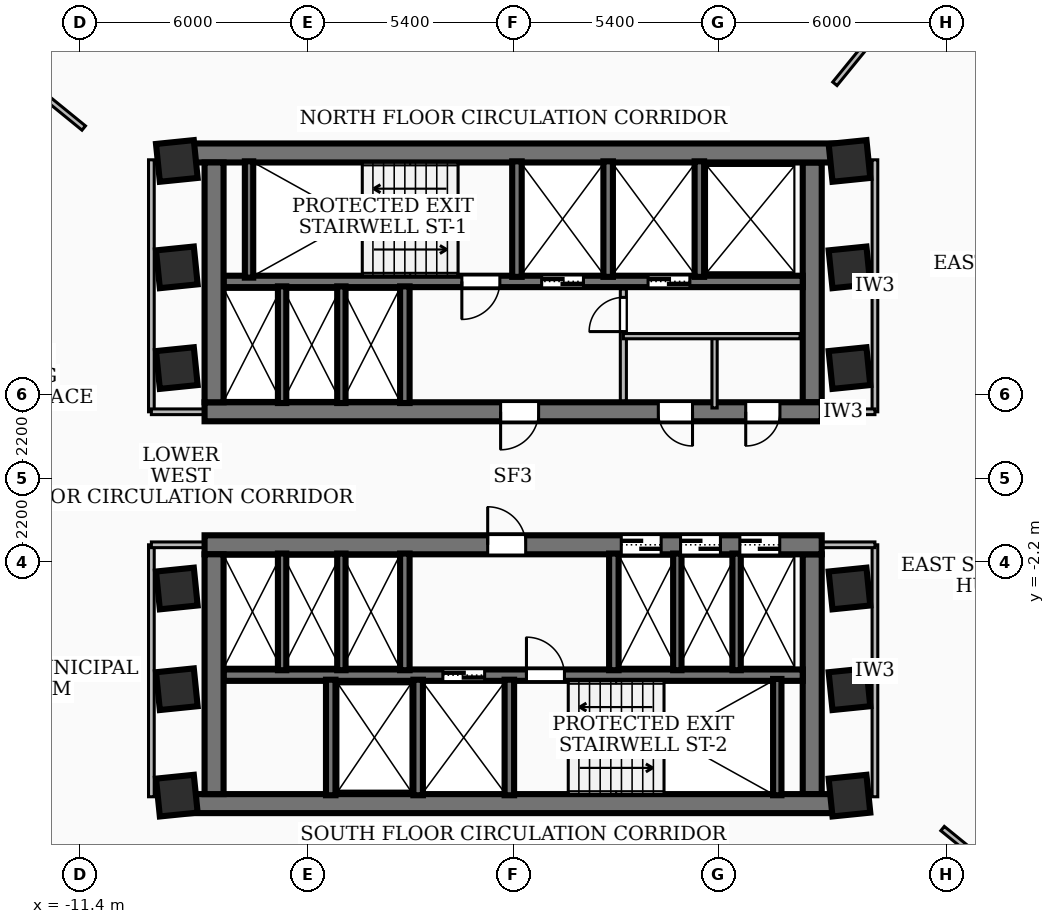
"""IFC4 building model, lengths in metres.
Left out: names, types, materials, properties, quantities, classifications, styles, units other than length and angle.
Written with IfcOpenShell. Run it as: python <this file> out.ifc"""

import sys

from ifc_helpers import new_model, si_unit, direction, frame, frame_2d, origin, origin_2d, place, context, subcontext, project, spatial, rectangle, extrude, element, fill, save


model = new_model("IFC4")
c1 = context("Model", 3, precision=1e-05, world=origin(), true_north=direction((0.0, 1.0)))
c2 = subcontext(c1, "Body", "Model", "MODEL_VIEW")
j1 = project(units=[si_unit("LENGTHUNIT", "METRE"), si_unit("PLANEANGLEUNIT", "RADIAN")], contexts=[c1])
p1 = place(None, origin())
s1 = spatial("IfcSite", under=j1, at=p1, CompositionType="ELEMENT")
p2 = place(p1, origin())
s2 = spatial("IfcBuilding", under=s1, at=p2, CompositionType="ELEMENT")
p3 = place(p2, frame((0.0, 0.0, 67.68)))
s3 = spatial("IfcBuildingStorey", under=s2, at=p3, CompositionType="ELEMENT", Elevation=67.68)
p4 = place(p3, frame((-8.78, 8.56, 0.0), z_axis=(0.0, 0.0, 1.0), x_axis=(1.0, 0.0, 0.0)))
e1 = element("IfcWall", 1, at=p4, inside=s3, PredefinedType="SHEAR", context=c2, shape_type="SweptSolid", body=[
    extrude(rectangle(XDim=17.56, YDim=0.5, at=frame_2d((8.78, 0.0))), origin(), (0.0, 0.0, 1.0), 3.34),
])
p5 = place(p3, frame((8.12, 1.75, 0.0), z_axis=(0.0, 0.0, 1.0), x_axis=(-1.0, 0.0, 0.0)))
e2 = element("IfcWall", 2, at=p5, inside=s3, PredefinedType="SHEAR", context=c2, shape_type="SweptSolid", body=[
    extrude(rectangle(XDim=16.24, YDim=0.5, at=frame_2d((8.12, 0.0))), origin(), (0.0, 0.0, 1.0), 3.34),
])
p6 = place(p5, frame((7.45, 0.0, 0.0)))
e3 = element("IfcOpeningElement", 3, at=p6, cuts=e2, PredefinedType="OPENING", context=c2, shape_type="SweptSolid", body=[
    extrude(rectangle(XDim=1.0, YDim=2.1, at=frame_2d((0.5, 1.05))), frame((0.0, 0.26, 0.0), z_axis=(0.0, -1.0, 0.0), x_axis=(1.0, 0.0, 0.0)), (0.0, 0.0, 1.0), 0.52),
])
p7 = place(p5, frame((3.4, 0.0, 0.0)))
e4 = element("IfcOpeningElement", 4, at=p7, cuts=e2, PredefinedType="OPENING", context=c2, shape_type="SweptSolid", body=[
    extrude(rectangle(XDim=0.9, YDim=2.06, at=frame_2d((0.45, 1.03))), frame((0.0, 0.26, 0.0), z_axis=(0.0, -1.0, 0.0), x_axis=(1.0, 0.0, 0.0)), (0.0, 0.0, 1.0), 0.52),
])
p8 = place(p5, frame((1.1, 0.0, 0.0)))
e5 = element("IfcOpeningElement", 5, at=p8, cuts=e2, PredefinedType="OPENING", context=c2, shape_type="SweptSolid", body=[
    extrude(rectangle(XDim=0.9, YDim=2.06, at=frame_2d((0.45, 1.03))), frame((0.0, 0.26, 0.0), z_axis=(0.0, -1.0, 0.0), x_axis=(1.0, 0.0, 0.0)), (0.0, 0.0, 1.0), 0.52),
])
for number, where, z_axis, x_axis in (
    (6, (-7.87, 2.0, 0.0), (0.0, 0.0, 1.0), (0.0, 1.0, 0.0)),
    (7, (7.87, 8.31, 0.0), (0.0, 0.0, 1.0), (0.0, -1.0, 0.0)),
):
    element("IfcWall", number, at=place(p3, frame(where, z_axis=z_axis, x_axis=x_axis)), inside=s3, PredefinedType="SHEAR", context=c2, shape_type="SweptSolid", body=[
        extrude(rectangle(XDim=6.31, YDim=0.5, at=frame_2d((3.155, 0.0))), origin(), (0.0, 0.0, 1.0), 3.34),
    ])
p9 = place(p3, frame((7.62, 5.18, 0.0), z_axis=(0.0, 0.0, 1.0), x_axis=(-1.0, 0.0, 0.0)))
e8 = element("IfcWall", 8, at=p9, inside=s3, PredefinedType="SOLIDWALL", context=c2, shape_type="SweptSolid", body=[
    extrude(rectangle(XDim=15.24, YDim=0.3, at=frame_2d((7.62, 0.0))), origin(), (0.0, 0.0, 1.0), 3.34),
])
p10 = place(p9, frame((5.77, 0.0, 0.0)))
e9 = element("IfcOpeningElement", 9, at=p10, cuts=e8, PredefinedType="OPENING", context=c2, shape_type="SweptSolid", body=[
    extrude(rectangle(XDim=1.1, YDim=2.15, at=frame_2d((0.55, 1.075))), frame((0.0, 0.16, 0.0), z_axis=(0.0, -1.0, 0.0), x_axis=(1.0, 0.0, 0.0)), (0.0, 0.0, 1.0), 0.32),
])
p11 = place(p9, frame((2.97, 0.0, 0.0)))
e10 = element("IfcOpeningElement", 10, at=p11, cuts=e8, PredefinedType="OPENING", context=c2, shape_type="SweptSolid", body=[
    extrude(rectangle(XDim=1.1, YDim=2.15, at=frame_2d((0.55, 1.075))), frame((0.0, 0.16, 0.0), z_axis=(0.0, -1.0, 0.0), x_axis=(1.0, 0.0, 0.0)), (0.0, 0.0, 1.0), 0.32),
])
p12 = place(p9, frame((7.97, 0.0, 0.0)))
e11 = element("IfcOpeningElement", 11, at=p12, cuts=e8, PredefinedType="OPENING", context=c2, shape_type="SweptSolid", body=[
    extrude(rectangle(XDim=1.0, YDim=2.1, at=frame_2d((0.5, 1.05))), frame((0.0, 0.16, 0.0), z_axis=(0.0, -1.0, 0.0), x_axis=(1.0, 0.0, 0.0)), (0.0, 0.0, 1.0), 0.32),
])
p13 = place(p3, frame((8.78, -8.56, 0.0), z_axis=(0.0, 0.0, 1.0), x_axis=(-1.0, 0.0, 0.0)))
e12 = element("IfcWall", 12, at=p13, inside=s3, PredefinedType="SHEAR", context=c2, shape_type="SweptSolid", body=[
    extrude(rectangle(XDim=17.56, YDim=0.5, at=frame_2d((8.78, 0.0))), origin(), (0.0, 0.0, 1.0), 3.34),
])
p14 = place(p3, frame((-8.12, -1.75, 0.0), z_axis=(0.0, 0.0, 1.0), x_axis=(1.0, 0.0, 0.0)))
e13 = element("IfcWall", 13, at=p14, inside=s3, PredefinedType="SHEAR", context=c2, shape_type="SweptSolid", body=[
    extrude(rectangle(XDim=16.24, YDim=0.5, at=frame_2d((8.12, 0.0))), origin(), (0.0, 0.0, 1.0), 3.34),
])
p15 = place(p14, frame((7.45, 0.0, 0.0)))
e14 = element("IfcOpeningElement", 14, at=p15, cuts=e13, PredefinedType="OPENING", context=c2, shape_type="SweptSolid", body=[
    extrude(rectangle(XDim=1.0, YDim=2.1, at=frame_2d((0.5, 1.05))), frame((0.0, 0.26, 0.0), z_axis=(0.0, -1.0, 0.0), x_axis=(1.0, 0.0, 0.0)), (0.0, 0.0, 1.0), 0.52),
])
p16 = place(p14, frame((10.965, 0.0, 0.0)))
e15 = element("IfcOpeningElement", 15, at=p16, cuts=e13, PredefinedType="OPENING", context=c2, shape_type="SweptSolid", body=[
    extrude(rectangle(XDim=1.05, YDim=2.15, at=frame_2d((0.525, 1.075))), frame((0.0, 0.26, 0.0), z_axis=(0.0, -1.0, 0.0), x_axis=(1.0, 0.0, 0.0)), (0.0, 0.0, 1.0), 0.52),
])
p17 = place(p14, frame((12.525, 0.0, 0.0)))
e16 = element("IfcOpeningElement", 16, at=p17, cuts=e13, PredefinedType="OPENING", context=c2, shape_type="SweptSolid", body=[
    extrude(rectangle(XDim=1.05, YDim=2.15, at=frame_2d((0.525, 1.075))), frame((0.0, 0.26, 0.0), z_axis=(0.0, -1.0, 0.0), x_axis=(1.0, 0.0, 0.0)), (0.0, 0.0, 1.0), 0.52),
])
p18 = place(p14, frame((14.085, 0.0, 0.0)))
e17 = element("IfcOpeningElement", 17, at=p18, cuts=e13, PredefinedType="OPENING", context=c2, shape_type="SweptSolid", body=[
    extrude(rectangle(XDim=1.05, YDim=2.15, at=frame_2d((0.525, 1.075))), frame((0.0, 0.26, 0.0), z_axis=(0.0, -1.0, 0.0), x_axis=(1.0, 0.0, 0.0)), (0.0, 0.0, 1.0), 0.52),
])
for number, where, z_axis, x_axis in (
    (18, (-7.87, -8.31, 0.0), (0.0, 0.0, 1.0), (0.0, 1.0, 0.0)),
    (19, (7.87, -2.0, 0.0), (0.0, 0.0, 1.0), (0.0, -1.0, 0.0)),
):
    element("IfcWall", number, at=place(p3, frame(where, z_axis=z_axis, x_axis=x_axis)), inside=s3, PredefinedType="SHEAR", context=c2, shape_type="SweptSolid", body=[
        extrude(rectangle(XDim=6.31, YDim=0.5, at=frame_2d((3.155, 0.0))), origin(), (0.0, 0.0, 1.0), 3.34),
    ])
p19 = place(p3, frame((-7.62, -5.18, 0.0), z_axis=(0.0, 0.0, 1.0), x_axis=(1.0, 0.0, 0.0)))
e20 = element("IfcWall", 20, at=p19, inside=s3, PredefinedType="SOLIDWALL", context=c2, shape_type="SweptSolid", body=[
    extrude(rectangle(XDim=15.24, YDim=0.3, at=frame_2d((7.62, 0.0))), origin(), (0.0, 0.0, 1.0), 3.34),
])
p20 = place(p19, frame((5.77, 0.0, 0.0)))
e21 = element("IfcOpeningElement", 21, at=p20, cuts=e20, PredefinedType="OPENING", context=c2, shape_type="SweptSolid", body=[
    extrude(rectangle(XDim=1.1, YDim=2.15, at=frame_2d((0.55, 1.075))), frame((0.0, 0.16, 0.0), z_axis=(0.0, -1.0, 0.0), x_axis=(1.0, 0.0, 0.0)), (0.0, 0.0, 1.0), 0.32),
])
p21 = place(p19, frame((7.97, 0.0, 0.0)))
e22 = element("IfcOpeningElement", 22, at=p21, cuts=e20, PredefinedType="OPENING", context=c2, shape_type="SweptSolid", body=[
    extrude(rectangle(XDim=1.0, YDim=2.1, at=frame_2d((0.5, 1.05))), frame((0.0, 0.16, 0.0), z_axis=(0.0, -1.0, 0.0), x_axis=(1.0, 0.0, 0.0)), (0.0, 0.0, 1.0), 0.32),
])
for number, where, z_axis, x_axis in (
    (23, (-6.95, 5.28, 0.0), (0.0, 0.0, 1.0), (0.0, 1.0, 0.0)),
    (24, (6.95, -8.34, 0.0), (0.0, 0.0, 1.0), (0.0, 1.0, 0.0)),
):
    element("IfcWall", number, at=place(p3, frame(where, z_axis=z_axis, x_axis=x_axis)), inside=s3, PredefinedType="SOLIDWALL", context=c2, shape_type="SweptSolid", body=[
        extrude(rectangle(XDim=3.06, YDim=0.22, at=frame_2d((1.53, 0.0))), origin(), (0.0, 0.0, 1.0), 3.34),
    ])
for number, where, z_axis, x_axis in (
    (25, (0.1, 5.3, 0.0), (0.0, 0.0, 1.0), (0.0, 1.0, 0.0)),
    (26, (2.5, 5.3, 0.0), (0.0, 0.0, 1.0), (0.0, 1.0, 0.0)),
    (27, (4.9, 5.3, 0.0), (0.0, 0.0, 1.0), (0.0, 1.0, 0.0)),
):
    element("IfcWall", number, at=place(p3, frame(where, z_axis=z_axis, x_axis=x_axis)), inside=s3, PredefinedType="SOLIDWALL", context=c2, shape_type="SweptSolid", body=[
        extrude(rectangle(XDim=3.04, YDim=0.25, at=frame_2d((1.52, 0.0))), origin(), (0.0, 0.0, 1.0), 3.34),
    ])
p22 = place(p3, frame((-2.85, 1.98, 0.0), z_axis=(0.0, 0.0, 1.0), x_axis=(0.0, 1.0, 0.0)))
e28 = element("IfcWall", 28, at=p22, inside=s3, PredefinedType="SOLIDWALL", context=c2, shape_type="SweptSolid", body=[
    extrude(rectangle(XDim=3.07, YDim=0.25, at=frame_2d((1.535, 0.0))), origin(), (0.0, 0.0, 1.0), 3.34),
])
for number, where, z_axis, x_axis in (
    (29, (-0.1, -8.34, 0.0), (0.0, 0.0, 1.0), (0.0, 1.0, 0.0)),
    (30, (-2.5, -8.34, 0.0), (0.0, 0.0, 1.0), (0.0, 1.0, 0.0)),
    (31, (-4.8, -8.34, 0.0), (0.0, 0.0, 1.0), (0.0, 1.0, 0.0)),
):
    element("IfcWall", number, at=place(p3, frame(where, z_axis=z_axis, x_axis=x_axis)), inside=s3, PredefinedType="SOLIDWALL", context=c2, shape_type="SweptSolid", body=[
        extrude(rectangle(XDim=3.04, YDim=0.25, at=frame_2d((1.52, 0.0))), origin(), (0.0, 0.0, 1.0), 3.34),
    ])
for number, where, z_axis, x_axis in (
    (32, (-2.85, -5.05, 0.0), (0.0, 0.0, 1.0), (0.0, 1.0, 0.0)),
    (33, (2.65, -5.05, 0.0), (0.0, 0.0, 1.0), (0.0, 1.0, 0.0)),
):
    element("IfcWall", number, at=place(p3, frame(where, z_axis=z_axis, x_axis=x_axis)), inside=s3, PredefinedType="SOLIDWALL", context=c2, shape_type="SweptSolid", body=[
        extrude(rectangle(XDim=3.07, YDim=0.25, at=frame_2d((1.535, 0.0))), origin(), (0.0, 0.0, 1.0), 3.34),
    ])
for number, where, z_axis, x_axis in (
    (34, (-6.08, 1.98, 0.0), (0.0, 0.0, 1.0), (0.0, 1.0, 0.0)),
    (35, (-4.52, 1.98, 0.0), (0.0, 0.0, 1.0), (0.0, 1.0, 0.0)),
    (36, (4.32, -5.05, 0.0), (0.0, 0.0, 1.0), (0.0, 1.0, 0.0)),
    (37, (5.88, -5.05, 0.0), (0.0, 0.0, 1.0), (0.0, 1.0, 0.0)),
    (38, (-6.08, -5.05, 0.0), (0.0, 0.0, 1.0), (0.0, 1.0, 0.0)),
    (39, (-4.52, -5.05, 0.0), (0.0, 0.0, 1.0), (0.0, 1.0, 0.0)),
):
    element("IfcWall", number, at=place(p3, frame(where, z_axis=z_axis, x_axis=x_axis)), inside=s3, PredefinedType="SOLIDWALL", context=c2, shape_type="SweptSolid", body=[
        extrude(rectangle(XDim=3.07, YDim=0.22, at=frame_2d((1.535, 0.0))), origin(), (0.0, 0.0, 1.0), 3.34),
    ])
for number, where, z_axis, x_axis in (
    (40, (-8.85, -5.55, 0.0), (0.0, 0.0, 1.0), (0.995, 0.101, 0.0)),
    (41, (-8.85, -2.9, 0.0), (0.0, 0.0, 1.0), (0.995, 0.101, 0.0)),
    (42, (-8.85, 2.9, 0.0), (0.0, 0.0, 1.0), (0.995, 0.101, 0.0)),
    (43, (-8.85, 5.55, 0.0), (0.0, 0.0, 1.0), (0.995, 0.101, 0.0)),
    (44, (8.85, -5.55, 0.0), (0.0, 0.0, 1.0), (0.995, 0.101, 0.0)),
    (45, (8.85, -2.9, 0.0), (0.0, 0.0, 1.0), (0.995, 0.101, 0.0)),
    (46, (8.85, 2.9, 0.0), (0.0, 0.0, 1.0), (0.995, 0.101, 0.0)),
    (47, (8.85, 5.55, 0.0), (0.0, 0.0, 1.0), (0.995, 0.101, 0.0)),
    (48, (-8.85, 8.35, 0.0), (0.0, 0.0, 1.0), (0.995, 0.101, 0.0)),
    (49, (8.85, -8.35, 0.0), (0.0, 0.0, 1.0), (0.995, 0.101, 0.0)),
    (50, (8.85, 8.35, 0.0), (0.0, 0.0, 1.0), (0.995, 0.101, 0.0)),
    (51, (-8.85, -8.35, 0.0), (0.0, 0.0, 1.0), (0.995, 0.101, 0.0)),
):
    element("IfcColumn", number, at=place(p3, frame(where, z_axis=z_axis, x_axis=x_axis)), inside=s3, PredefinedType="COLUMN", context=c2, shape_type="SweptSolid", body=[
        extrude(rectangle(XDim=1.0, YDim=1.0, at=origin_2d()), origin(), (0.0, 0.0, 1.0), 3.6),
    ])
p23 = place(p3, frame((2.9, 2.04, 0.0), z_axis=(0.0, 0.0, 1.0), x_axis=(0.0, 1.0, 0.0)))
e52 = element("IfcWall", 52, at=p23, inside=s3, PredefinedType="PARTITIONING", context=c2, shape_type="SweptSolid", body=[
    extrude(rectangle(XDim=2.94, YDim=0.16, at=frame_2d((1.47, 0.0))), origin(), (0.0, 0.0, 1.0), 2.405),
])
p24 = place(p23, frame((1.82, 0.0, 0.0)))
e53 = element("IfcOpeningElement", 53, at=p24, cuts=e52, PredefinedType="OPENING", context=c2, shape_type="SweptSolid", body=[
    extrude(rectangle(XDim=0.9, YDim=2.06, at=frame_2d((0.45, 1.03))), frame((0.0, 0.09, 0.0), z_axis=(0.0, -1.0, 0.0), x_axis=(1.0, 0.0, 0.0)), (0.0, 0.0, 1.0), 0.18),
])
p25 = place(p3, frame((2.9, 3.74, 0.0), z_axis=(0.0, 0.0, 1.0), x_axis=(1.0, 0.0, 0.0)))
e54 = element("IfcWall", 54, at=p25, inside=s3, PredefinedType="PARTITIONING", context=c2, shape_type="SweptSolid", body=[
    extrude(rectangle(XDim=4.65, YDim=0.138, at=frame_2d((2.325, 0.0))), origin(), (0.0, 0.0, 1.0), 3.34),
])
p26 = place(p3, frame((5.3, 1.85, 0.0), z_axis=(0.0, 0.0, 1.0), x_axis=(0.0, 1.0, 0.0)))
e55 = element("IfcWall", 55, at=p26, inside=s3, PredefinedType="PARTITIONING", context=c2, shape_type="SweptSolid", body=[
    extrude(rectangle(XDim=1.89, YDim=0.138, at=frame_2d((0.945, 0.0))), origin(), (0.0, 0.0, 1.0), 2.405),
])
p27 = place(p3, frame((-9.52, 1.75, 0.0), z_axis=(0.0, 0.0, 1.0), x_axis=(0.0, 1.0, 0.0)))
e56 = element("IfcWall", 56, at=p27, inside=s3, PredefinedType="PARTITIONING", context=c2, shape_type="SweptSolid", body=[
    extrude(rectangle(XDim=6.63, YDim=0.15, at=frame_2d((3.315, 0.0))), origin(), (0.0, 0.0, 1.0), 2.486),
])
p28 = place(p3, frame((-7.85, 1.75, 0.0), z_axis=(0.0, 0.0, 1.0), x_axis=(-1.0, 0.0, 0.0)))
e57 = element("IfcWall", 57, at=p28, inside=s3, PredefinedType="PARTITIONING", context=c2, shape_type="SweptSolid", body=[
    extrude(rectangle(XDim=1.67, YDim=0.15, at=frame_2d((0.835, 0.0))), origin(), (0.0, 0.0, 1.0), 2.405),
])
p29 = place(p3, frame((-9.52, -8.38, 0.0), z_axis=(0.0, 0.0, 1.0), x_axis=(0.0, 1.0, 0.0)))
e58 = element("IfcWall", 58, at=p29, inside=s3, PredefinedType="PARTITIONING", context=c2, shape_type="SweptSolid", body=[
    extrude(rectangle(XDim=6.63, YDim=0.15, at=frame_2d((3.315, 0.0))), origin(), (0.0, 0.0, 1.0), 2.486),
])
p30 = place(p3, frame((-7.85, -1.75, 0.0), z_axis=(0.0, 0.0, 1.0), x_axis=(-1.0, 0.0, 0.0)))
e59 = element("IfcWall", 59, at=p30, inside=s3, PredefinedType="PARTITIONING", context=c2, shape_type="SweptSolid", body=[
    extrude(rectangle(XDim=1.67, YDim=0.15, at=frame_2d((0.835, 0.0))), origin(), (0.0, 0.0, 1.0), 2.405),
])
p31 = place(p3, frame((9.52, 1.75, 0.0), z_axis=(0.0, 0.0, 1.0), x_axis=(0.0, 1.0, 0.0)))
e60 = element("IfcWall", 60, at=p31, inside=s3, PredefinedType="PARTITIONING", context=c2, shape_type="SweptSolid", body=[
    extrude(rectangle(XDim=6.63, YDim=0.15, at=frame_2d((3.315, 0.0))), origin(), (0.0, 0.0, 1.0), 2.486),
])
p32 = place(p3, frame((7.85, 1.75, 0.0), z_axis=(0.0, 0.0, 1.0), x_axis=(1.0, 0.0, 0.0)))
e61 = element("IfcWall", 61, at=p32, inside=s3, PredefinedType="PARTITIONING", context=c2, shape_type="SweptSolid", body=[
    extrude(rectangle(XDim=1.67, YDim=0.15, at=frame_2d((0.835, 0.0))), origin(), (0.0, 0.0, 1.0), 2.405),
])
p33 = place(p3, frame((9.52, -8.38, 0.0), z_axis=(0.0, 0.0, 1.0), x_axis=(0.0, 1.0, 0.0)))
e62 = element("IfcWall", 62, at=p33, inside=s3, PredefinedType="PARTITIONING", context=c2, shape_type="SweptSolid", body=[
    extrude(rectangle(XDim=6.63, YDim=0.15, at=frame_2d((3.315, 0.0))), origin(), (0.0, 0.0, 1.0), 2.486),
])
p34 = place(p3, frame((7.85, -1.75, 0.0), z_axis=(0.0, 0.0, 1.0), x_axis=(1.0, 0.0, 0.0)))
e63 = element("IfcWall", 63, at=p34, inside=s3, PredefinedType="PARTITIONING", context=c2, shape_type="SweptSolid", body=[
    extrude(rectangle(XDim=1.67, YDim=0.15, at=frame_2d((0.835, 0.0))), origin(), (0.0, 0.0, 1.0), 2.405),
])
p35 = place(p3, frame((8.466, 10.38, 0.0), z_axis=(0.0, 0.0, 1.0), x_axis=(0.631992375104, 0.774974604623, 0.0)))
e64 = element("IfcWall", 64, at=p35, inside=s3, PredefinedType="PARTITIONING", context=c2, shape_type="SweptSolid", body=[
    extrude(rectangle(XDim=6.26, YDim=0.145, at=frame_2d((3.13, 0.0))), origin(), (0.0, 0.0, 1.0), 3.34),
])
for number, where, z_axis, x_axis in (
    (65, (-11.3, 9.216, 0.0), (0.0, 0.0, 1.0), (-0.775, 0.632, 0.0)),
    (66, (11.3, -9.216, 0.0), (0.0, 0.0, 1.0), (0.775, -0.632, 0.0)),
):
    element("IfcWall", number, at=place(p3, frame(where, z_axis=z_axis, x_axis=x_axis)), inside=s3, PredefinedType="PARTITIONING", context=c2, shape_type="SweptSolid", body=[
        extrude(rectangle(XDim=5.073, YDim=0.145, at=frame_2d((2.536, 0.0))), origin(), (0.0, 0.0, 1.0), 3.34),
    ])
p36 = place(p6, origin())
e67 = element("IfcDoor", 67, at=p36, inside=s3, OperationType="SINGLE_SWING_RIGHT", PredefinedType="DOOR", context=c2, shape_type="SweptSolid", body=[
    extrude(rectangle(XDim=1.0, YDim=2.1, at=frame_2d((0.5, 1.05))), frame((0.0, 0.025, 0.0), z_axis=(0.0, -1.0, 0.0), x_axis=(1.0, 0.0, 0.0)), (0.0, 0.0, 1.0), 0.05),
])
fill(e3, e67)
p37 = place(p15, origin())
e68 = element("IfcDoor", 68, at=p37, inside=s3, OperationType="SINGLE_SWING_LEFT", PredefinedType="DOOR", context=c2, shape_type="SweptSolid", body=[
    extrude(rectangle(XDim=1.0, YDim=2.1, at=frame_2d((0.5, 1.05))), frame((0.0, 0.025, 0.0), z_axis=(0.0, -1.0, 0.0), x_axis=(1.0, 0.0, 0.0)), (0.0, 0.0, 1.0), 0.05),
])
fill(e14, e68)
p38 = place(p10, origin())
e69 = element("IfcDoor", 69, at=p38, inside=s3, OperationType="DOUBLE_DOOR_SLIDING", PredefinedType="DOOR", context=c2, shape_type="SweptSolid", body=[
    extrude(rectangle(XDim=1.1, YDim=2.15, at=frame_2d((0.55, 1.075))), frame((0.0, 0.025, 0.0), z_axis=(0.0, -1.0, 0.0), x_axis=(1.0, 0.0, 0.0)), (0.0, 0.0, 1.0), 0.05),
])
fill(e9, e69)
p39 = place(p11, origin())
e70 = element("IfcDoor", 70, at=p39, inside=s3, OperationType="DOUBLE_DOOR_SLIDING", PredefinedType="DOOR", context=c2, shape_type="SweptSolid", body=[
    extrude(rectangle(XDim=1.1, YDim=2.15, at=frame_2d((0.55, 1.075))), frame((0.0, 0.025, 0.0), z_axis=(0.0, -1.0, 0.0), x_axis=(1.0, 0.0, 0.0)), (0.0, 0.0, 1.0), 0.05),
])
fill(e10, e70)
p40 = place(p12, origin())
e71 = element("IfcDoor", 71, at=p40, inside=s3, OperationType="SINGLE_SWING_RIGHT", PredefinedType="DOOR", context=c2, shape_type="SweptSolid", body=[
    extrude(rectangle(XDim=1.0, YDim=2.1, at=frame_2d((0.5, 1.05))), frame((0.0, 0.025, 0.0), z_axis=(0.0, -1.0, 0.0), x_axis=(1.0, 0.0, 0.0)), (0.0, 0.0, 1.0), 0.05),
])
fill(e11, e71)
p41 = place(p20, origin())
e72 = element("IfcDoor", 72, at=p41, inside=s3, OperationType="DOUBLE_DOOR_SLIDING", PredefinedType="DOOR", context=c2, shape_type="SweptSolid", body=[
    extrude(rectangle(XDim=1.1, YDim=2.15, at=frame_2d((0.55, 1.075))), frame((0.0, 0.025, 0.0), z_axis=(0.0, -1.0, 0.0), x_axis=(1.0, 0.0, 0.0)), (0.0, 0.0, 1.0), 0.05),
])
fill(e21, e72)
p42 = place(p21, origin())
e73 = element("IfcDoor", 73, at=p42, inside=s3, OperationType="SINGLE_SWING_LEFT", PredefinedType="DOOR", context=c2, shape_type="SweptSolid", body=[
    extrude(rectangle(XDim=1.0, YDim=2.1, at=frame_2d((0.5, 1.05))), frame((0.0, 0.025, 0.0), z_axis=(0.0, -1.0, 0.0), x_axis=(1.0, 0.0, 0.0)), (0.0, 0.0, 1.0), 0.05),
])
fill(e22, e73)
p43 = place(p16, origin())
e74 = element("IfcDoor", 74, at=p43, inside=s3, OperationType="DOUBLE_DOOR_SLIDING", PredefinedType="DOOR", context=c2, shape_type="SweptSolid", body=[
    extrude(rectangle(XDim=1.05, YDim=2.15, at=frame_2d((0.525, 1.075))), frame((0.0, 0.025, 0.0), z_axis=(0.0, -1.0, 0.0), x_axis=(1.0, 0.0, 0.0)), (0.0, 0.0, 1.0), 0.05),
])
fill(e15, e74)
p44 = place(p17, origin())
e75 = element("IfcDoor", 75, at=p44, inside=s3, OperationType="DOUBLE_DOOR_SLIDING", PredefinedType="DOOR", context=c2, shape_type="SweptSolid", body=[
    extrude(rectangle(XDim=1.05, YDim=2.15, at=frame_2d((0.525, 1.075))), frame((0.0, 0.025, 0.0), z_axis=(0.0, -1.0, 0.0), x_axis=(1.0, 0.0, 0.0)), (0.0, 0.0, 1.0), 0.05),
])
fill(e16, e75)
p45 = place(p18, origin())
e76 = element("IfcDoor", 76, at=p45, inside=s3, OperationType="DOUBLE_DOOR_SLIDING", PredefinedType="DOOR", context=c2, shape_type="SweptSolid", body=[
    extrude(rectangle(XDim=1.05, YDim=2.15, at=frame_2d((0.525, 1.075))), frame((0.0, 0.025, 0.0), z_axis=(0.0, -1.0, 0.0), x_axis=(1.0, 0.0, 0.0)), (0.0, 0.0, 1.0), 0.05),
])
fill(e17, e76)
p46 = place(p7, origin())
e77 = element("IfcDoor", 77, at=p46, inside=s3, OperationType="SINGLE_SWING_LEFT", PredefinedType="DOOR", context=c2, shape_type="SweptSolid", body=[
    extrude(rectangle(XDim=0.9, YDim=2.06, at=frame_2d((0.45, 1.03))), frame((0.0, 0.025, 0.0), z_axis=(0.0, -1.0, 0.0), x_axis=(1.0, 0.0, 0.0)), (0.0, 0.0, 1.0), 0.05),
])
fill(e4, e77)
p47 = place(p8, origin())
e78 = element("IfcDoor", 78, at=p47, inside=s3, OperationType="SINGLE_SWING_RIGHT", PredefinedType="DOOR", context=c2, shape_type="SweptSolid", body=[
    extrude(rectangle(XDim=0.9, YDim=2.06, at=frame_2d((0.45, 1.03))), frame((0.0, 0.025, 0.0), z_axis=(0.0, -1.0, 0.0), x_axis=(1.0, 0.0, 0.0)), (0.0, 0.0, 1.0), 0.05),
])
fill(e5, e78)
p48 = place(p24, origin())
e79 = element("IfcDoor", 79, at=p48, inside=s3, OperationType="SINGLE_SWING_LEFT", PredefinedType="DOOR", context=c2, shape_type="SweptSolid", body=[
    extrude(rectangle(XDim=0.9, YDim=2.06, at=frame_2d((0.45, 1.03))), frame((0.0, 0.025, 0.0), z_axis=(0.0, -1.0, 0.0), x_axis=(1.0, 0.0, 0.0)), (0.0, 0.0, 1.0), 0.05),
])
fill(e53, e79)
save(model, sys.argv[1])
